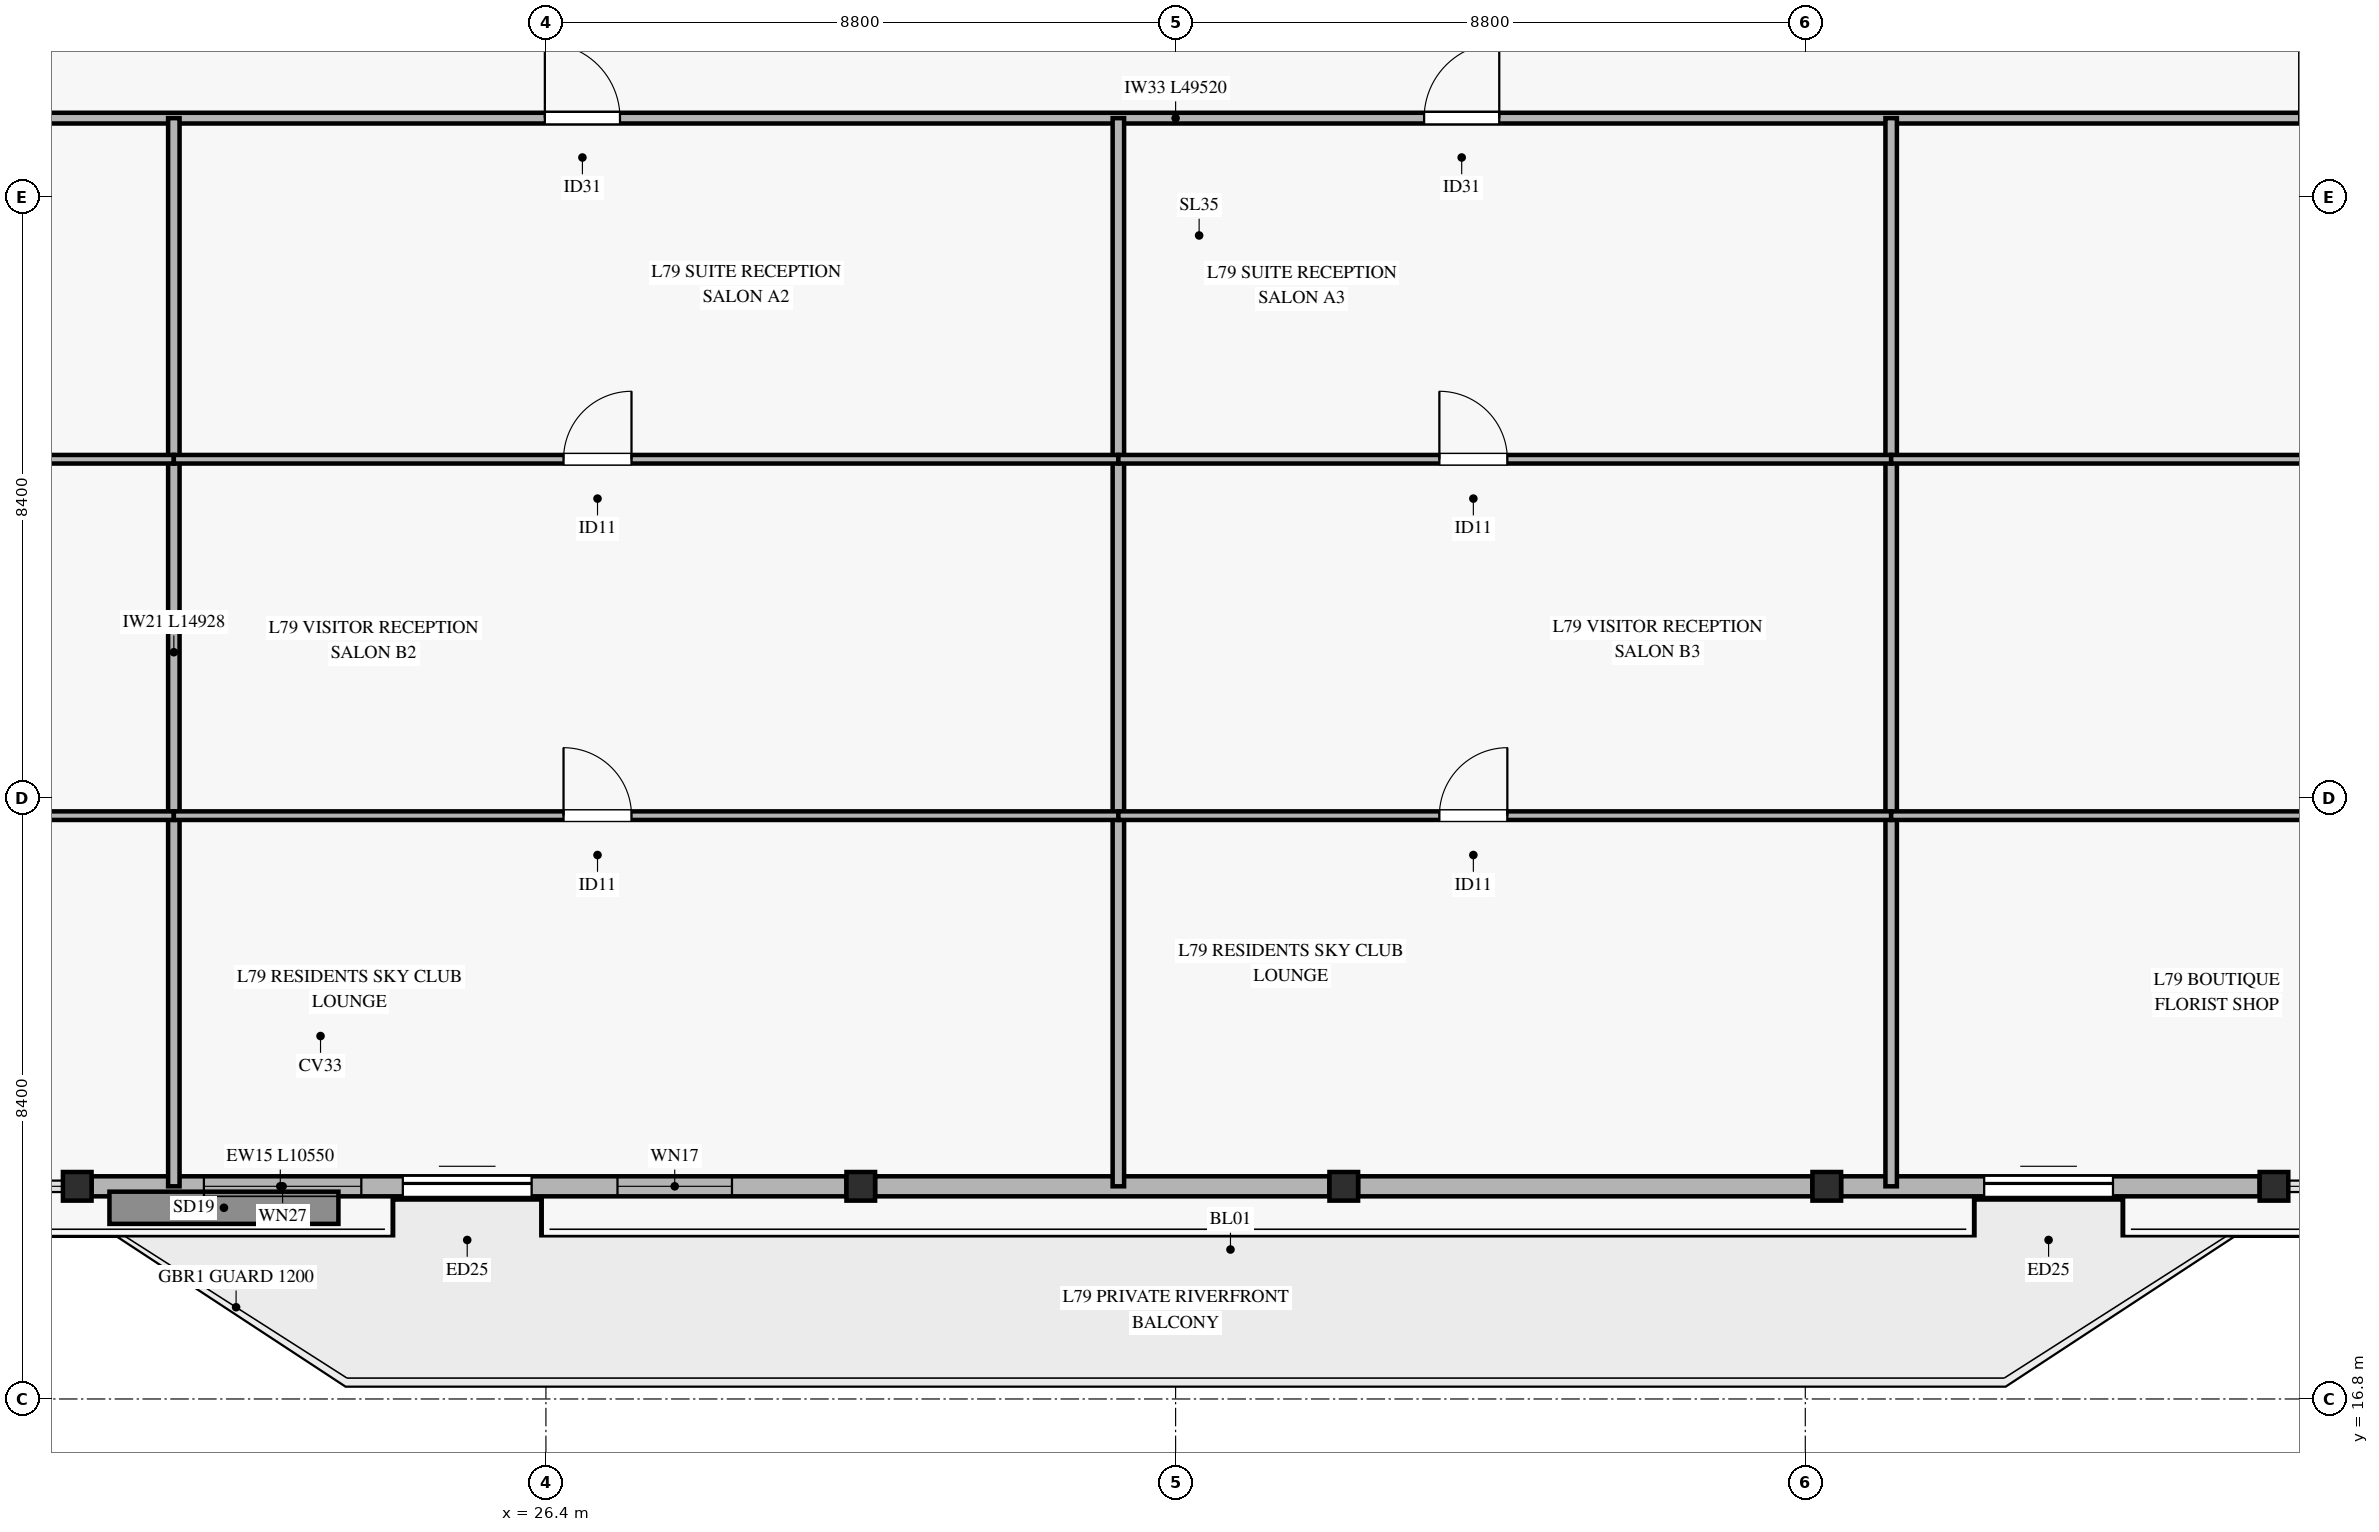
"""IFC4 building model, lengths in metres.
Left out: names, types, materials, properties, quantities, classifications, styles, units other than length and angle.
Written with IfcOpenShell. Run it as: python <this file> out.ifc"""

import sys

from ifc_helpers import new_model, si_unit, direction, frame, frame_2d, origin, origin_2d, place, context, subcontext, project, spatial, rectangle, hollow_rectangle, extrude, source, transform, mapped, element, fill, save


model = new_model("IFC4")
c1 = context("Model", 3, precision=1e-05, world=origin(), true_north=direction((0.0, 1.0)))
c2 = subcontext(c1, "Body", "Model", "MODEL_VIEW")
j1 = project(units=[si_unit("LENGTHUNIT", "METRE"), si_unit("PLANEANGLEUNIT", "RADIAN")], contexts=[c1])
p1 = place(None, origin())
s1 = spatial("IfcSite", under=j1, at=p1, CompositionType="ELEMENT")
p2 = place(p1, origin())
s2 = spatial("IfcBuilding", under=s1, at=p2, CompositionType="ELEMENT")
p3 = place(p2, frame((0.0, 0.0, 307.4)))
s3 = spatial("IfcBuildingStorey", under=s2, at=p3, CompositionType="ELEMENT", Elevation=307.4)
m1 = source(origin(), c2, "Body", "SweptSolid", [
    extrude(hollow_rectangle(XDim=0.4, YDim=0.4, WallThickness=0.02, at=origin_2d()), origin(), (0.0, 0.0, 1.0), 3.185),
])
for number, where, z_axis, x_axis in (
    (1, (19.85, 19.772, 0.0), (0.0, 0.0, 1.0), (1.0, 0.0, 0.0)),
    (2, (30.8, 19.772, 0.0), (0.0, 0.0, 1.0), (1.0, 0.0, 0.0)),
    (3, (37.55, 19.772, 0.0), (0.0, 0.0, 1.0), (1.0, 0.0, 0.0)),
    (4, (44.3, 19.772, 0.0), (0.0, 0.0, 1.0), (1.0, 0.0, 0.0)),
    (5, (50.55, 19.772, 0.0), (0.0, 0.0, 1.0), (1.0, 0.0, 0.0)),
):
    element("IfcColumn", number, at=place(p3, frame(where, z_axis=z_axis, x_axis=x_axis)), inside=s3, PredefinedType="COLUMN", context=c2, shape_type="MappedRepresentation", body=[
        mapped(m1, transform((0.0, 0.0, 0.0), x_axis=(1.0, 0.0, 0.0), y_axis=(0.0, 1.0, 0.0), z_axis=(0.0, 0.0, 1.0), scale=1.0)),
    ])
p4 = place(p3, frame((20.05, 19.772, 0.0), z_axis=(0.0, 0.0, 1.0), x_axis=(1.0, 0.0, 0.0)))
e6 = element("IfcWall", 6, at=p4, inside=s3, PredefinedType="SOLIDWALL", context=c2, shape_type="SweptSolid", body=[
    extrude(rectangle(XDim=10.55, YDim=0.28, at=frame_2d((5.275, 0.0))), origin(), (0.0, 0.0, 1.0), 2.815),
])
p5 = place(p4, frame((4.35, 0.0, 0.0)))
e7 = element("IfcOpeningElement", 7, at=p5, cuts=e6, PredefinedType="OPENING", context=c2, shape_type="SweptSolid", body=[
    extrude(rectangle(XDim=1.8, YDim=2.25, at=frame_2d((0.9, 1.125))), frame((0.0, 0.15, 0.0), z_axis=(0.0, -1.0, 0.0), x_axis=(1.0, 0.0, 0.0)), (0.0, 0.0, 1.0), 0.3),
])
p6 = place(p4, frame((1.57, 0.0, 0.45)))
e8 = element("IfcOpeningElement", 8, at=p6, cuts=e6, PredefinedType="OPENING", context=c2, shape_type="SweptSolid", body=[
    extrude(rectangle(XDim=2.2, YDim=2.1, at=frame_2d((1.1, 1.05))), frame((0.0, 0.15, 0.0), z_axis=(0.0, -1.0, 0.0), x_axis=(1.0, 0.0, 0.0)), (0.0, 0.0, 1.0), 0.3),
])
p7 = place(p4, frame((7.35, 0.0, 0.45)))
e9 = element("IfcOpeningElement", 9, at=p7, cuts=e6, PredefinedType="OPENING", context=c2, shape_type="SweptSolid", body=[
    extrude(rectangle(XDim=1.6, YDim=2.0, at=frame_2d((0.8, 1.0))), frame((0.0, 0.15, 0.0), z_axis=(0.0, -1.0, 0.0), x_axis=(1.0, 0.0, 0.0)), (0.0, 0.0, 1.0), 0.3),
])
for number, where, z_axis, x_axis in (
    (10, (31.0, 19.772, 0.0), (0.0, 0.0, 1.0), (1.0, 0.0, 0.0)),
    (11, (37.75, 19.772, 0.0), (0.0, 0.0, 1.0), (1.0, 0.0, 0.0)),
):
    element("IfcWall", number, at=place(p3, frame(where, z_axis=z_axis, x_axis=x_axis)), inside=s3, PredefinedType="SOLIDWALL", context=c2, shape_type="SweptSolid", body=[
        extrude(rectangle(XDim=6.35, YDim=0.28, at=frame_2d((3.175, 0.0))), origin(), (0.0, 0.0, 1.0), 2.815),
    ])
p8 = place(p3, frame((44.5, 19.772, 0.0), z_axis=(0.0, 0.0, 1.0), x_axis=(1.0, 0.0, 0.0)))
e12 = element("IfcWall", 12, at=p8, inside=s3, PredefinedType="SOLIDWALL", context=c2, shape_type="SweptSolid", body=[
    extrude(rectangle(XDim=5.85, YDim=0.28, at=frame_2d((2.925, 0.0))), origin(), (0.0, 0.0, 1.0), 2.815),
])
p9 = place(p8, frame((2.0, 0.0, 0.0)))
e13 = element("IfcOpeningElement", 13, at=p9, cuts=e12, PredefinedType="OPENING", context=c2, shape_type="SweptSolid", body=[
    extrude(rectangle(XDim=1.8, YDim=2.25, at=frame_2d((0.9, 1.125))), frame((0.0, 0.15, 0.0), z_axis=(0.0, -1.0, 0.0), x_axis=(1.0, 0.0, 0.0)), (0.0, 0.0, 1.0), 0.3),
])
p10 = place(p3, frame((10.44, 34.7, 0.0), z_axis=(0.0, 0.0, 1.0), x_axis=(1.0, 0.0, 0.0)))
e14 = element("IfcWall", 14, at=p10, inside=s3, PredefinedType="PARTITIONING", context=c2, shape_type="SweptSolid", body=[
    extrude(rectangle(XDim=49.52, YDim=0.15, at=frame_2d((24.76, 0.0))), origin(), (0.0, 0.0, 1.0), 2.47),
])
p11 = place(p10, frame((4.382, 0.0, 0.0)))
e15 = element("IfcOpeningElement", 15, at=p11, cuts=e14, PredefinedType="OPENING", context=c2, shape_type="SweptSolid", body=[
    extrude(rectangle(XDim=1.05, YDim=2.15, at=frame_2d((0.525, 1.075))), frame((0.0, 0.085, 0.0), z_axis=(0.0, -1.0, 0.0), x_axis=(1.0, 0.0, 0.0)), (0.0, 0.0, 1.0), 0.17),
])
p12 = place(p10, frame((15.945, 0.0, 0.0)))
e16 = element("IfcOpeningElement", 16, at=p12, cuts=e14, PredefinedType="OPENING", context=c2, shape_type="SweptSolid", body=[
    extrude(rectangle(XDim=1.05, YDim=2.15, at=frame_2d((0.525, 1.075))), frame((0.0, 0.085, 0.0), z_axis=(0.0, -1.0, 0.0), x_axis=(1.0, 0.0, 0.0)), (0.0, 0.0, 1.0), 0.17),
])
p13 = place(p10, frame((28.233, 0.0, 0.0)))
e17 = element("IfcOpeningElement", 17, at=p13, cuts=e14, PredefinedType="OPENING", context=c2, shape_type="SweptSolid", body=[
    extrude(rectangle(XDim=1.05, YDim=2.15, at=frame_2d((0.525, 1.075))), frame((0.0, 0.085, 0.0), z_axis=(0.0, -1.0, 0.0), x_axis=(1.0, 0.0, 0.0)), (0.0, 0.0, 1.0), 0.17),
])
p14 = place(p10, frame((40.462, 0.0, 0.0)))
e18 = element("IfcOpeningElement", 18, at=p14, cuts=e14, PredefinedType="OPENING", context=c2, shape_type="SweptSolid", body=[
    extrude(rectangle(XDim=1.05, YDim=2.15, at=frame_2d((0.525, 1.075))), frame((0.0, 0.085, 0.0), z_axis=(0.0, -1.0, 0.0), x_axis=(1.0, 0.0, 0.0)), (0.0, 0.0, 1.0), 0.17),
])
for number, where, z_axis, x_axis in (
    (19, (21.2, 19.772, 0.0), (0.0, 0.0, 1.0), (0.0, 1.0, 0.0)),
    (20, (34.4, 19.772, 0.0), (0.0, 0.0, 1.0), (0.0, 1.0, 0.0)),
    (21, (45.2, 19.772, 0.0), (0.0, 0.0, 1.0), (0.0, 1.0, 0.0)),
):
    element("IfcWall", number, at=place(p3, frame(where, z_axis=z_axis, x_axis=x_axis)), inside=s3, PredefinedType="PARTITIONING", context=c2, shape_type="SweptSolid", body=[
        extrude(rectangle(XDim=14.928, YDim=0.16, at=frame_2d((7.464, 0.0))), origin(), (0.0, 0.0, 1.0), 2.77),
    ])
p15 = place(p3, frame((10.44, 24.952, 0.0), z_axis=(0.0, 0.0, 1.0), x_axis=(1.0, 0.0, 0.0)))
e22 = element("IfcWall", 22, at=p15, inside=s3, PredefinedType="PARTITIONING", context=c2, shape_type="SweptSolid", body=[
    extrude(rectangle(XDim=10.76, YDim=0.12, at=frame_2d((5.38, 0.0))), origin(), (0.0, 0.0, 1.0), 2.47),
])
p16 = place(p15, frame((4.59, 0.0, 0.0)))
e23 = element("IfcOpeningElement", 23, at=p16, cuts=e22, PredefinedType="OPENING", context=c2, shape_type="SweptSolid", body=[
    extrude(rectangle(XDim=0.95, YDim=2.1, at=frame_2d((0.475, 1.05))), frame((0.0, 0.07, 0.0), z_axis=(0.0, -1.0, 0.0), x_axis=(1.0, 0.0, 0.0)), (0.0, 0.0, 1.0), 0.14),
])
p17 = place(p3, frame((10.44, 29.933, 0.0), z_axis=(0.0, 0.0, 1.0), x_axis=(1.0, 0.0, 0.0)))
e24 = element("IfcWall", 24, at=p17, inside=s3, PredefinedType="PARTITIONING", context=c2, shape_type="SweptSolid", body=[
    extrude(rectangle(XDim=10.76, YDim=0.12, at=frame_2d((5.38, 0.0))), origin(), (0.0, 0.0, 1.0), 2.47),
])
p18 = place(p17, frame((4.59, 0.0, 0.0)))
e25 = element("IfcOpeningElement", 25, at=p18, cuts=e24, PredefinedType="OPENING", context=c2, shape_type="SweptSolid", body=[
    extrude(rectangle(XDim=0.95, YDim=2.1, at=frame_2d((0.475, 1.05))), frame((0.0, 0.07, 0.0), z_axis=(0.0, -1.0, 0.0), x_axis=(1.0, 0.0, 0.0)), (0.0, 0.0, 1.0), 0.14),
])
p19 = place(p3, frame((21.2, 24.952, 0.0), z_axis=(0.0, 0.0, 1.0), x_axis=(1.0, 0.0, 0.0)))
e26 = element("IfcWall", 26, at=p19, inside=s3, PredefinedType="PARTITIONING", context=c2, shape_type="SweptSolid", body=[
    extrude(rectangle(XDim=13.2, YDim=0.12, at=frame_2d((6.6, 0.0))), origin(), (0.0, 0.0, 1.0), 2.47),
])
p20 = place(p19, frame((5.446, 0.0, 0.0)))
e27 = element("IfcOpeningElement", 27, at=p20, cuts=e26, PredefinedType="OPENING", context=c2, shape_type="SweptSolid", body=[
    extrude(rectangle(XDim=0.95, YDim=2.1, at=frame_2d((0.475, 1.05))), frame((0.0, 0.07, 0.0), z_axis=(0.0, -1.0, 0.0), x_axis=(1.0, 0.0, 0.0)), (0.0, 0.0, 1.0), 0.14),
])
p21 = place(p3, frame((21.2, 29.933, 0.0), z_axis=(0.0, 0.0, 1.0), x_axis=(1.0, 0.0, 0.0)))
e28 = element("IfcWall", 28, at=p21, inside=s3, PredefinedType="PARTITIONING", context=c2, shape_type="SweptSolid", body=[
    extrude(rectangle(XDim=13.2, YDim=0.12, at=frame_2d((6.6, 0.0))), origin(), (0.0, 0.0, 1.0), 2.47),
])
p22 = place(p21, frame((5.446, 0.0, 0.0)))
e29 = element("IfcOpeningElement", 29, at=p22, cuts=e28, PredefinedType="OPENING", context=c2, shape_type="SweptSolid", body=[
    extrude(rectangle(XDim=0.95, YDim=2.1, at=frame_2d((0.475, 1.05))), frame((0.0, 0.07, 0.0), z_axis=(0.0, -1.0, 0.0), x_axis=(1.0, 0.0, 0.0)), (0.0, 0.0, 1.0), 0.14),
])
p23 = place(p3, frame((34.4, 24.952, 0.0), z_axis=(0.0, 0.0, 1.0), x_axis=(1.0, 0.0, 0.0)))
e30 = element("IfcWall", 30, at=p23, inside=s3, PredefinedType="PARTITIONING", context=c2, shape_type="SweptSolid", body=[
    extrude(rectangle(XDim=10.8, YDim=0.12, at=frame_2d((5.4, 0.0))), origin(), (0.0, 0.0, 1.0), 2.47),
])
p24 = place(p23, frame((4.486, 0.0, 0.0)))
e31 = element("IfcOpeningElement", 31, at=p24, cuts=e30, PredefinedType="OPENING", context=c2, shape_type="SweptSolid", body=[
    extrude(rectangle(XDim=0.95, YDim=2.1, at=frame_2d((0.475, 1.05))), frame((0.0, 0.07, 0.0), z_axis=(0.0, -1.0, 0.0), x_axis=(1.0, 0.0, 0.0)), (0.0, 0.0, 1.0), 0.14),
])
p25 = place(p3, frame((34.4, 29.933, 0.0), z_axis=(0.0, 0.0, 1.0), x_axis=(1.0, 0.0, 0.0)))
e32 = element("IfcWall", 32, at=p25, inside=s3, PredefinedType="PARTITIONING", context=c2, shape_type="SweptSolid", body=[
    extrude(rectangle(XDim=10.8, YDim=0.12, at=frame_2d((5.4, 0.0))), origin(), (0.0, 0.0, 1.0), 2.47),
])
p26 = place(p25, frame((4.486, 0.0, 0.0)))
e33 = element("IfcOpeningElement", 33, at=p26, cuts=e32, PredefinedType="OPENING", context=c2, shape_type="SweptSolid", body=[
    extrude(rectangle(XDim=0.95, YDim=2.1, at=frame_2d((0.475, 1.05))), frame((0.0, 0.07, 0.0), z_axis=(0.0, -1.0, 0.0), x_axis=(1.0, 0.0, 0.0)), (0.0, 0.0, 1.0), 0.14),
])
p27 = place(p3, frame((45.2, 24.952, 0.0), z_axis=(0.0, 0.0, 1.0), x_axis=(1.0, 0.0, 0.0)))
e34 = element("IfcWall", 34, at=p27, inside=s3, PredefinedType="PARTITIONING", context=c2, shape_type="SweptSolid", body=[
    extrude(rectangle(XDim=14.76, YDim=0.12, at=frame_2d((7.38, 0.0))), origin(), (0.0, 0.0, 1.0), 2.47),
])
p28 = place(p27, frame((5.99, 0.0, 0.0)))
e35 = element("IfcOpeningElement", 35, at=p28, cuts=e34, PredefinedType="OPENING", context=c2, shape_type="SweptSolid", body=[
    extrude(rectangle(XDim=0.95, YDim=2.1, at=frame_2d((0.475, 1.05))), frame((0.0, 0.07, 0.0), z_axis=(0.0, -1.0, 0.0), x_axis=(1.0, 0.0, 0.0)), (0.0, 0.0, 1.0), 0.14),
])
p29 = place(p3, frame((45.2, 29.933, 0.0), z_axis=(0.0, 0.0, 1.0), x_axis=(1.0, 0.0, 0.0)))
e36 = element("IfcWall", 36, at=p29, inside=s3, PredefinedType="PARTITIONING", context=c2, shape_type="SweptSolid", body=[
    extrude(rectangle(XDim=14.76, YDim=0.12, at=frame_2d((7.38, 0.0))), origin(), (0.0, 0.0, 1.0), 2.47),
])
p30 = place(p29, frame((5.99, 0.0, 0.0)))
e37 = element("IfcOpeningElement", 37, at=p30, cuts=e36, PredefinedType="OPENING", context=c2, shape_type="SweptSolid", body=[
    extrude(rectangle(XDim=0.95, YDim=2.1, at=frame_2d((0.475, 1.05))), frame((0.0, 0.07, 0.0), z_axis=(0.0, -1.0, 0.0), x_axis=(1.0, 0.0, 0.0)), (0.0, 0.0, 1.0), 0.14),
])
m2 = source(origin(), c2, "Body", "SweptSolid", [
    extrude(rectangle(XDim=1.8, YDim=2.25, at=frame_2d((0.9, 1.125))), frame((0.0, 0.025, 0.0), z_axis=(0.0, -1.0, 0.0), x_axis=(1.0, 0.0, 0.0)), (0.0, 0.0, 1.0), 0.05),
])
p31 = place(p5, origin())
e38 = element("IfcDoor", 38, at=p31, inside=s3, OperationType="SLIDING_TO_LEFT", PredefinedType="DOOR", context=c2, shape_type="MappedRepresentation", body=[
    mapped(m2, transform((0.0, 0.0, 0.0), x_axis=(1.0, 0.0, 0.0), y_axis=(0.0, 1.0, 0.0), z_axis=(0.0, 0.0, 1.0), scale=1.0)),
])
fill(e7, e38)
m3 = source(origin(), c2, "Body", "SweptSolid", [
    extrude(rectangle(XDim=2.2, YDim=2.1, at=frame_2d((1.1, 1.05))), frame((0.0, 0.03, 0.0), z_axis=(0.0, -1.0, 0.0), x_axis=(1.0, 0.0, 0.0)), (0.0, 0.0, 1.0), 0.06),
])
p32 = place(p6, origin())
e39 = element("IfcWindow", 39, at=p32, inside=s3, PartitioningType="SINGLE_PANEL", PredefinedType="WINDOW", context=c2, shape_type="MappedRepresentation", body=[
    mapped(m3, transform((0.0, 0.0, 0.0), x_axis=(1.0, 0.0, 0.0), y_axis=(0.0, 1.0, 0.0), z_axis=(0.0, 0.0, 1.0), scale=1.0)),
])
fill(e8, e39)
m4 = source(origin(), c2, "Body", "SweptSolid", [
    extrude(rectangle(XDim=1.6, YDim=2.0, at=frame_2d((0.8, 1.0))), frame((0.0, 0.03, 0.0), z_axis=(0.0, -1.0, 0.0), x_axis=(1.0, 0.0, 0.0)), (0.0, 0.0, 1.0), 0.06),
])
p33 = place(p7, origin())
e40 = element("IfcWindow", 40, at=p33, inside=s3, PartitioningType="SINGLE_PANEL", PredefinedType="WINDOW", context=c2, shape_type="MappedRepresentation", body=[
    mapped(m4, transform((0.0, 0.0, 0.0), x_axis=(1.0, 0.0, 0.0), y_axis=(0.0, 1.0, 0.0), z_axis=(0.0, 0.0, 1.0), scale=1.0)),
])
fill(e9, e40)
p34 = place(p9, origin())
e41 = element("IfcDoor", 41, at=p34, inside=s3, OperationType="SLIDING_TO_LEFT", PredefinedType="DOOR", context=c2, shape_type="MappedRepresentation", body=[
    mapped(m2, transform((0.0, 0.0, 0.0), x_axis=(1.0, 0.0, 0.0), y_axis=(0.0, 1.0, 0.0), z_axis=(0.0, 0.0, 1.0), scale=1.0)),
])
fill(e13, e41)
m5 = source(origin(), c2, "Body", "SweptSolid", [
    extrude(rectangle(XDim=1.05, YDim=2.15, at=frame_2d((0.525, 1.075))), frame((0.0, 0.025, 0.0), z_axis=(0.0, -1.0, 0.0), x_axis=(1.0, 0.0, 0.0)), (0.0, 0.0, 1.0), 0.05),
])
p35 = place(p12, origin())
e42 = element("IfcDoor", 42, at=p35, inside=s3, OperationType="SINGLE_SWING_LEFT", PredefinedType="DOOR", context=c2, shape_type="MappedRepresentation", body=[
    mapped(m5, transform((0.0, 0.0, 0.0), x_axis=(1.0, 0.0, 0.0), y_axis=(0.0, 1.0, 0.0), z_axis=(0.0, 0.0, 1.0), scale=1.0)),
])
fill(e16, e42)
m6 = source(origin(), c2, "Body", "SweptSolid", [
    extrude(rectangle(XDim=0.95, YDim=2.1, at=frame_2d((0.475, 1.05))), frame((0.0, 0.025, 0.0), z_axis=(0.0, -1.0, 0.0), x_axis=(1.0, 0.0, 0.0)), (0.0, 0.0, 1.0), 0.05),
])
p36 = place(p22, origin())
e43 = element("IfcDoor", 43, at=p36, inside=s3, OperationType="SINGLE_SWING_RIGHT", PredefinedType="DOOR", context=c2, shape_type="MappedRepresentation", body=[
    mapped(m6, transform((0.0, 0.0, 0.0), x_axis=(1.0, 0.0, 0.0), y_axis=(0.0, 1.0, 0.0), z_axis=(0.0, 0.0, 1.0), scale=1.0)),
])
fill(e29, e43)
p37 = place(p20, origin())
e44 = element("IfcDoor", 44, at=p37, inside=s3, OperationType="SINGLE_SWING_LEFT", PredefinedType="DOOR", context=c2, shape_type="MappedRepresentation", body=[
    mapped(m6, transform((0.0, 0.0, 0.0), x_axis=(1.0, 0.0, 0.0), y_axis=(0.0, 1.0, 0.0), z_axis=(0.0, 0.0, 1.0), scale=1.0)),
])
fill(e27, e44)
p38 = place(p13, origin())
e45 = element("IfcDoor", 45, at=p38, inside=s3, OperationType="SINGLE_SWING_RIGHT", PredefinedType="DOOR", context=c2, shape_type="MappedRepresentation", body=[
    mapped(m5, transform((0.0, 0.0, 0.0), x_axis=(1.0, 0.0, 0.0), y_axis=(0.0, 1.0, 0.0), z_axis=(0.0, 0.0, 1.0), scale=1.0)),
])
fill(e17, e45)
p39 = place(p26, origin())
e46 = element("IfcDoor", 46, at=p39, inside=s3, OperationType="SINGLE_SWING_LEFT", PredefinedType="DOOR", context=c2, shape_type="MappedRepresentation", body=[
    mapped(m6, transform((0.0, 0.0, 0.0), x_axis=(1.0, 0.0, 0.0), y_axis=(0.0, 1.0, 0.0), z_axis=(0.0, 0.0, 1.0), scale=1.0)),
])
fill(e33, e46)
p40 = place(p24, origin())
e47 = element("IfcDoor", 47, at=p40, inside=s3, OperationType="SINGLE_SWING_RIGHT", PredefinedType="DOOR", context=c2, shape_type="MappedRepresentation", body=[
    mapped(m6, transform((0.0, 0.0, 0.0), x_axis=(1.0, 0.0, 0.0), y_axis=(0.0, 1.0, 0.0), z_axis=(0.0, 0.0, 1.0), scale=1.0)),
])
fill(e31, e47)
save(model, sys.argv[1])
